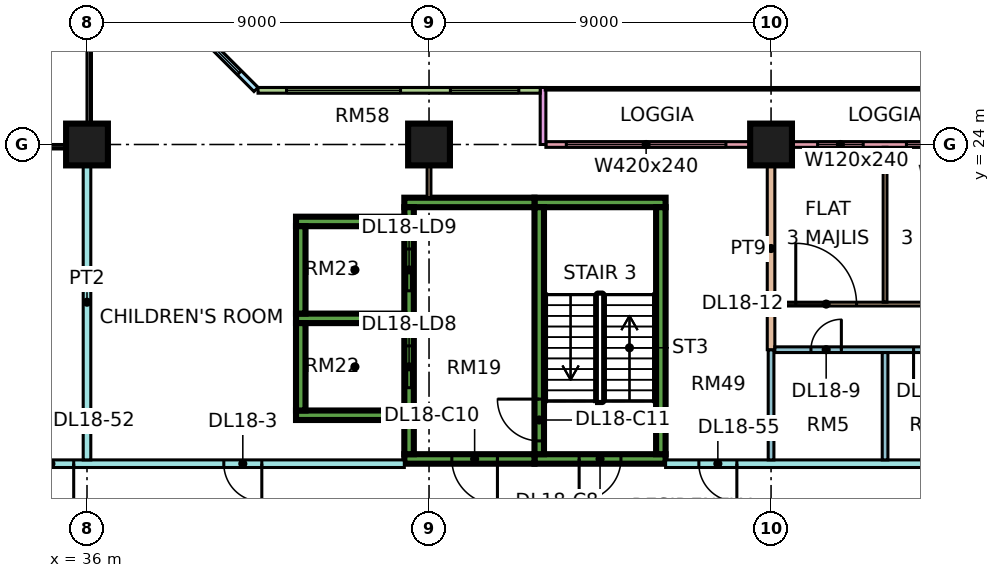
"""IFC4 building model, lengths in metres.
Left out: names, types, materials, properties, quantities, classifications, styles, units other than length and angle.
Written with IfcOpenShell. Run it as: python <this file> out.ifc"""

import sys

from ifc_helpers import new_model, si_unit, direction, frame, frame_2d, origin, origin_2d, place, context, subcontext, project, spatial, rectangle, extrude, element, fill, save


model = new_model("IFC4")
c1 = context("Model", 3, precision=1e-05, world=origin(), true_north=direction((0.0, 1.0)))
c2 = subcontext(c1, "Body", "Model", "MODEL_VIEW")
j1 = project(units=[si_unit("LENGTHUNIT", "METRE"), si_unit("PLANEANGLEUNIT", "RADIAN")], contexts=[c1])
p1 = place(None, origin())
s1 = spatial("IfcSite", under=j1, at=p1, CompositionType="ELEMENT")
p2 = place(p1, origin())
s2 = spatial("IfcBuilding", under=s1, at=p2, CompositionType="ELEMENT")
p3 = place(p2, frame((0.0, 0.0, 82.65)))
s3 = spatial("IfcBuildingStorey", under=s2, at=p3, CompositionType="ELEMENT", Elevation=82.65)
for number, where, z_axis, x_axis in (
    (1, (36.0, 24.0, 0.0), (0.0, 0.0, 1.0), (1.0, 0.0, 0.0)),
    (2, (45.0, 24.0, 0.0), (0.0, 0.0, 1.0), (1.0, 0.0, 0.0)),
    (3, (54.0, 24.0, 0.0), (0.0, 0.0, 1.0), (1.0, 0.0, 0.0)),
):
    element("IfcColumn", number, at=place(p3, frame(where, z_axis=z_axis, x_axis=x_axis)), inside=s3, PredefinedType="COLUMN", context=c2, shape_type="SweptSolid", body=[
        extrude(rectangle(XDim=1.1, YDim=1.1, at=origin_2d()), origin(), (0.0, 0.0, 1.0), 3.75),
    ])
p4 = place(p3, frame((47.775, 15.725, 0.0), z_axis=(0.0, 0.0, 1.0), x_axis=(1.0, 0.0, 0.0)))
e4 = element("IfcWall", 4, at=p4, inside=s3, PredefinedType="SHEAR", context=c2, shape_type="SweptSolid", body=[
    extrude(rectangle(XDim=3.45, YDim=0.25, at=frame_2d((1.725, 0.0))), origin(), (0.0, 0.0, 1.0), 3.75),
])
p5 = place(p4, frame((1.175, 0.0, 0.0)))
e5 = element("IfcOpeningElement", 5, at=p5, cuts=e4, PredefinedType="OPENING", context=c2, shape_type="SweptSolid", body=[
    extrude(rectangle(XDim=1.1, YDim=2.2, at=frame_2d((0.55, 1.1))), frame((0.0, 0.135, 0.0), z_axis=(0.0, -1.0, 0.0), x_axis=(1.0, 0.0, 0.0)), (0.0, 0.0, 1.0), 0.27),
])
p6 = place(p3, frame((47.775, 22.475, 0.0), z_axis=(0.0, 0.0, 1.0), x_axis=(1.0, 0.0, 0.0)))
e6 = element("IfcWall", 6, at=p6, inside=s3, PredefinedType="SHEAR", context=c2, shape_type="SweptSolid", body=[
    extrude(rectangle(XDim=3.45, YDim=0.25, at=frame_2d((1.725, 0.0))), origin(), (0.0, 0.0, 1.0), 3.75),
])
p7 = place(p3, frame((47.9, 15.85, 0.0), z_axis=(0.0, 0.0, 1.0), x_axis=(0.0, 1.0, 0.0)))
e7 = element("IfcWall", 7, at=p7, inside=s3, PredefinedType="SHEAR", context=c2, shape_type="SweptSolid", body=[
    extrude(rectangle(XDim=6.5, YDim=0.25, at=frame_2d((3.25, 0.0))), origin(), (0.0, 0.0, 1.0), 3.75),
])
p8 = place(p7, frame((0.35, 0.0, 0.0)))
e8 = element("IfcOpeningElement", 8, at=p8, cuts=e7, PredefinedType="OPENING", context=c2, shape_type="SweptSolid", body=[
    extrude(rectangle(XDim=1.1, YDim=2.2, at=frame_2d((0.55, 1.1))), frame((0.0, 0.135, 0.0), z_axis=(0.0, -1.0, 0.0), x_axis=(1.0, 0.0, 0.0)), (0.0, 0.0, 1.0), 0.27),
])
p9 = place(p3, frame((51.1, 15.85, 0.0), z_axis=(0.0, 0.0, 1.0), x_axis=(0.0, 1.0, 0.0)))
e9 = element("IfcWall", 9, at=p9, inside=s3, PredefinedType="SHEAR", context=c2, shape_type="SweptSolid", body=[
    extrude(rectangle(XDim=6.5, YDim=0.25, at=frame_2d((3.25, 0.0))), origin(), (0.0, 0.0, 1.0), 3.75),
])
p10 = place(p3, frame((44.35, 15.725, 0.0), z_axis=(0.0, 0.0, 1.0), x_axis=(1.0, 0.0, 0.0)))
e10 = element("IfcWall", 10, at=p10, inside=s3, PredefinedType="SHEAR", context=c2, shape_type="SweptSolid", body=[
    extrude(rectangle(XDim=3.425, YDim=0.25, at=frame_2d((1.712, 0.0))), origin(), (0.0, 0.0, 1.0), 3.75),
])
p11 = place(p10, frame((1.25, 0.0, 0.0)))
e11 = element("IfcOpeningElement", 11, at=p11, cuts=e10, PredefinedType="OPENING", context=c2, shape_type="SweptSolid", body=[
    extrude(rectangle(XDim=1.2, YDim=2.2, at=frame_2d((0.6, 1.1))), frame((0.0, 0.135, 0.0), z_axis=(0.0, -1.0, 0.0), x_axis=(1.0, 0.0, 0.0)), (0.0, 0.0, 1.0), 0.27),
])
p12 = place(p3, frame((44.35, 22.475, 0.0), z_axis=(0.0, 0.0, 1.0), x_axis=(1.0, 0.0, 0.0)))
e12 = element("IfcWall", 12, at=p12, inside=s3, PredefinedType="SHEAR", context=c2, shape_type="SweptSolid", body=[
    extrude(rectangle(XDim=3.425, YDim=0.25, at=frame_2d((1.712, 0.0))), origin(), (0.0, 0.0, 1.0), 3.75),
])
p13 = place(p3, frame((44.475, 15.85, 0.0), z_axis=(0.0, 0.0, 1.0), x_axis=(0.0, 1.0, 0.0)))
e13 = element("IfcWall", 13, at=p13, inside=s3, PredefinedType="SHEAR", context=c2, shape_type="SweptSolid", body=[
    extrude(rectangle(XDim=6.5, YDim=0.25, at=frame_2d((3.25, 0.0))), origin(), (0.0, 0.0, 1.0), 3.75),
])
p14 = place(p13, frame((1.75, 0.0, 0.0)))
e14 = element("IfcOpeningElement", 14, at=p14, cuts=e13, PredefinedType="OPENING", context=c2, shape_type="SweptSolid", body=[
    extrude(rectangle(XDim=1.1, YDim=2.2, at=frame_2d((0.55, 1.1))), frame((0.0, 0.135, 0.0), z_axis=(0.0, -1.0, 0.0), x_axis=(1.0, 0.0, 0.0)), (0.0, 0.0, 1.0), 0.27),
])
p15 = place(p13, frame((4.3, 0.0, 0.0)))
e15 = element("IfcOpeningElement", 15, at=p15, cuts=e13, PredefinedType="OPENING", context=c2, shape_type="SweptSolid", body=[
    extrude(rectangle(XDim=1.1, YDim=2.2, at=frame_2d((0.55, 1.1))), frame((0.0, 0.135, 0.0), z_axis=(0.0, -1.0, 0.0), x_axis=(1.0, 0.0, 0.0)), (0.0, 0.0, 1.0), 0.27),
])
for number, where, z_axis, x_axis in (
    (16, (41.5, 16.875, 0.0), (0.0, 0.0, 1.0), (1.0, 0.0, 0.0)),
    (17, (41.5, 19.425, 0.0), (0.0, 0.0, 1.0), (1.0, 0.0, 0.0)),
    (18, (41.5, 21.975, 0.0), (0.0, 0.0, 1.0), (1.0, 0.0, 0.0)),
):
    element("IfcWall", number, at=place(p3, frame(where, z_axis=z_axis, x_axis=x_axis)), inside=s3, PredefinedType="SHEAR", context=c2, shape_type="SweptSolid", body=[
        extrude(rectangle(XDim=2.85, YDim=0.25, at=frame_2d((1.425, 0.0))), origin(), (0.0, 0.0, 1.0), 3.75),
    ])
for number, where, z_axis, x_axis in (
    (19, (41.625, 17.0, 0.0), (0.0, 0.0, 1.0), (0.0, 1.0, 0.0)),
    (20, (41.625, 19.55, 0.0), (0.0, 0.0, 1.0), (0.0, 1.0, 0.0)),
):
    element("IfcWall", number, at=place(p3, frame(where, z_axis=z_axis, x_axis=x_axis)), inside=s3, PredefinedType="SHEAR", context=c2, shape_type="SweptSolid", body=[
        extrude(rectangle(XDim=2.3, YDim=0.25, at=frame_2d((1.15, 0.0))), origin(), (0.0, 0.0, 1.0), 3.75),
    ])
p16 = place(p3, frame((59.925, 24.0, 0.0), z_axis=(0.0, 0.0, 1.0), x_axis=(-1.0, 0.0, 0.0)))
e21 = element("IfcWall", 21, at=p16, inside=s3, PredefinedType="SOLIDWALL", context=c2, shape_type="SweptSolid", body=[
    extrude(rectangle(XDim=11.85, YDim=0.15, at=frame_2d((5.925, 0.0))), origin(), (0.0, 0.0, 1.0), 3.3),
])
p17 = place(p16, frame((0.562, 0.0, 0.45)))
e22 = element("IfcOpeningElement", 22, at=p17, cuts=e21, PredefinedType="OPENING", context=c2, shape_type="SweptSolid", body=[
    extrude(rectangle(XDim=1.8, YDim=2.4, at=frame_2d((0.9, 1.2))), frame((0.0, 0.085, 0.0), z_axis=(0.0, -1.0, 0.0), x_axis=(1.0, 0.0, 0.0)), (0.0, 0.0, 1.0), 0.17),
])
p18 = place(p16, frame((3.5, 0.0, 0.45)))
e23 = element("IfcOpeningElement", 23, at=p18, cuts=e21, PredefinedType="OPENING", context=c2, shape_type="SweptSolid", body=[
    extrude(rectangle(XDim=1.2, YDim=2.4, at=frame_2d((0.6, 1.2))), frame((0.0, 0.085, 0.0), z_axis=(0.0, -1.0, 0.0), x_axis=(1.0, 0.0, 0.0)), (0.0, 0.0, 1.0), 0.17),
])
p19 = place(p16, frame((7.113, 0.0, 0.45)))
e24 = element("IfcOpeningElement", 24, at=p19, cuts=e21, PredefinedType="OPENING", context=c2, shape_type="SweptSolid", body=[
    extrude(rectangle(XDim=4.2, YDim=2.4, at=frame_2d((2.1, 1.2))), frame((0.0, 0.085, 0.0), z_axis=(0.0, -1.0, 0.0), x_axis=(1.0, 0.0, 0.0)), (0.0, 0.0, 1.0), 0.17),
])
p20 = place(p3, frame((48.0, 25.5, 0.0), z_axis=(0.0, 0.0, 1.0), x_axis=(0.0, -1.0, 0.0)))
e25 = element("IfcWall", 25, at=p20, inside=s3, PredefinedType="SOLIDWALL", context=c2, shape_type="SweptSolid", body=[
    extrude(rectangle(XDim=1.5, YDim=0.15, at=frame_2d((0.75, 0.0))), origin(), (0.0, 0.0, 1.0), 3.3),
])
p21 = place(p3, frame((47.925, 25.425, 0.0), z_axis=(0.0, 0.0, 1.0), x_axis=(-1.0, 0.0, 0.0)))
e26 = element("IfcWall", 26, at=p21, inside=s3, PredefinedType="SOLIDWALL", context=c2, shape_type="SweptSolid", body=[
    extrude(rectangle(XDim=7.425, YDim=0.15, at=frame_2d((3.712, 0.0))), origin(), (0.0, 0.0, 1.0), 3.3),
])
p22 = place(p21, frame((0.562, 0.0, 0.45)))
e27 = element("IfcOpeningElement", 27, at=p22, cuts=e26, PredefinedType="OPENING", context=c2, shape_type="SweptSolid", body=[
    extrude(rectangle(XDim=1.8, YDim=2.4, at=frame_2d((0.9, 1.2))), frame((0.0, 0.085, 0.0), z_axis=(0.0, -1.0, 0.0), x_axis=(1.0, 0.0, 0.0)), (0.0, 0.0, 1.0), 0.17),
])
p23 = place(p21, frame((3.675, 0.0, 0.45)))
e28 = element("IfcOpeningElement", 28, at=p23, cuts=e26, PredefinedType="OPENING", context=c2, shape_type="SweptSolid", body=[
    extrude(rectangle(XDim=3.0, YDim=2.4, at=frame_2d((1.5, 1.2))), frame((0.0, 0.085, 0.0), z_axis=(0.0, -1.0, 0.0), x_axis=(1.0, 0.0, 0.0)), (0.0, 0.0, 1.0), 0.17),
])
p24 = place(p3, frame((40.447, 25.447, 0.0), z_axis=(0.0, 0.0, 1.0), x_axis=(-0.707106781187, 0.707106781187, 0.0)))
e29 = element("IfcWall", 29, at=p24, inside=s3, PredefinedType="SOLIDWALL", context=c2, shape_type="SweptSolid", body=[
    extrude(rectangle(XDim=4.243, YDim=0.15, at=frame_2d((2.121, 0.0))), origin(), (0.0, 0.0, 1.0), 3.3),
])
p25 = place(p24, frame((0.621, 0.0, 0.45)))
e30 = element("IfcOpeningElement", 30, at=p25, cuts=e29, PredefinedType="OPENING", context=c2, shape_type="SweptSolid", body=[
    extrude(rectangle(XDim=3.0, YDim=2.4, at=frame_2d((1.5, 1.2))), frame((0.0, 0.085, 0.0), z_axis=(0.0, -1.0, 0.0), x_axis=(1.0, 0.0, 0.0)), (0.0, 0.0, 1.0), 0.17),
])
p26 = place(p3, frame((34.0, 15.6, 0.0), z_axis=(0.0, 0.0, 1.0), x_axis=(1.0, 0.0, 0.0)))
e31 = element("IfcWall", 31, at=p26, inside=s3, PredefinedType="PARTITIONING", context=c2, shape_type="SweptSolid", body=[
    extrude(rectangle(XDim=10.35, YDim=0.2, at=frame_2d((5.175, 0.0))), origin(), (0.0, 0.0, 1.0), 3.3),
])
p27 = place(p26, frame((5.6, 0.0, 0.0)))
e32 = element("IfcOpeningElement", 32, at=p27, cuts=e31, PredefinedType="OPENING", context=c2, shape_type="SweptSolid", body=[
    extrude(rectangle(XDim=1.0, YDim=2.1, at=frame_2d((0.5, 1.05))), frame((0.0, 0.11, 0.0), z_axis=(0.0, -1.0, 0.0), x_axis=(1.0, 0.0, 0.0)), (0.0, 0.0, 1.0), 0.22),
])
p28 = place(p26, frame((0.45, 0.0, 0.0)))
e33 = element("IfcOpeningElement", 33, at=p28, cuts=e31, PredefinedType="OPENING", context=c2, shape_type="SweptSolid", body=[
    extrude(rectangle(XDim=1.2, YDim=2.1, at=frame_2d((0.6, 1.05))), frame((0.0, 0.11, 0.0), z_axis=(0.0, -1.0, 0.0), x_axis=(1.0, 0.0, 0.0)), (0.0, 0.0, 1.0), 0.22),
])
p29 = place(p3, frame((36.0, 15.7, 0.0), z_axis=(0.0, 0.0, 1.0), x_axis=(0.0, 1.0, 0.0)))
e34 = element("IfcWall", 34, at=p29, inside=s3, PredefinedType="PARTITIONING", context=c2, shape_type="SweptSolid", body=[
    extrude(rectangle(XDim=8.3, YDim=0.2, at=frame_2d((4.15, 0.0))), origin(), (0.0, 0.0, 1.0), 3.3),
])
p30 = place(p3, frame((45.0, 22.6, 0.0), z_axis=(0.0, 0.0, 1.0), x_axis=(0.0, 1.0, 0.0)))
e35 = element("IfcWall", 35, at=p30, inside=s3, PredefinedType="PARTITIONING", context=c2, shape_type="SweptSolid", body=[
    extrude(rectangle(XDim=1.4, YDim=0.1, at=frame_2d((0.7, 0.0))), origin(), (0.0, 0.0, 1.0), 3.3),
])
p31 = place(p3, frame((51.225, 15.6, 0.0), z_axis=(0.0, 0.0, 1.0), x_axis=(1.0, 0.0, 0.0)))
e36 = element("IfcWall", 36, at=p31, inside=s3, PredefinedType="PARTITIONING", context=c2, shape_type="SweptSolid", body=[
    extrude(rectangle(XDim=22.125, YDim=0.2, at=frame_2d((11.062, 0.0))), origin(), (0.0, 0.0, 1.0), 3.3),
])
p32 = place(p31, frame((12.425, 0.0, 0.0)))
e37 = element("IfcOpeningElement", 37, at=p32, cuts=e36, PredefinedType="OPENING", context=c2, shape_type="SweptSolid", body=[
    extrude(rectangle(XDim=1.0, YDim=2.1, at=frame_2d((0.5, 1.05))), frame((0.0, 0.11, 0.0), z_axis=(0.0, -1.0, 0.0), x_axis=(1.0, 0.0, 0.0)), (0.0, 0.0, 1.0), 0.22),
])
p33 = place(p31, frame((0.875, 0.0, 0.0)))
e38 = element("IfcOpeningElement", 38, at=p33, cuts=e36, PredefinedType="OPENING", context=c2, shape_type="SweptSolid", body=[
    extrude(rectangle(XDim=1.0, YDim=2.1, at=frame_2d((0.5, 1.05))), frame((0.0, 0.11, 0.0), z_axis=(0.0, -1.0, 0.0), x_axis=(1.0, 0.0, 0.0)), (0.0, 0.0, 1.0), 0.22),
])
p34 = place(p3, frame((54.0, 15.7, 0.0), z_axis=(0.0, 0.0, 1.0), x_axis=(0.0, 1.0, 0.0)))
e39 = element("IfcWall", 39, at=p34, inside=s3, PredefinedType="PARTITIONING", context=c2, shape_type="SweptSolid", body=[
    extrude(rectangle(XDim=2.9, YDim=0.15, at=frame_2d((1.45, 0.0))), origin(), (0.0, 0.0, 1.0), 3.3),
])
p35 = place(p3, frame((54.0, 18.6, 0.0), z_axis=(0.0, 0.0, 1.0), x_axis=(0.0, 1.0, 0.0)))
e40 = element("IfcWall", 40, at=p35, inside=s3, PredefinedType="PARTITIONING", context=c2, shape_type="SweptSolid", body=[
    extrude(rectangle(XDim=5.326, YDim=0.2, at=frame_2d((2.663, 0.0))), origin(), (0.0, 0.0, 1.0), 3.3),
])
p36 = place(p3, frame((54.1, 18.6, 0.0), z_axis=(0.0, 0.0, 1.0), x_axis=(1.0, 0.0, 0.0)))
e41 = element("IfcWall", 41, at=p36, inside=s3, PredefinedType="PARTITIONING", context=c2, shape_type="SweptSolid", body=[
    extrude(rectangle(XDim=8.975, YDim=0.15, at=frame_2d((4.487, 0.0))), origin(), (0.0, 0.0, 1.0), 3.3),
])
p37 = place(p36, frame((6.65, 0.0, 0.0)))
e42 = element("IfcOpeningElement", 42, at=p37, cuts=e41, PredefinedType="OPENING", context=c2, shape_type="SweptSolid", body=[
    extrude(rectangle(XDim=0.8, YDim=2.1, at=frame_2d((0.4, 1.05))), frame((0.0, 0.085, 0.0), z_axis=(0.0, -1.0, 0.0), x_axis=(1.0, 0.0, 0.0)), (0.0, 0.0, 1.0), 0.17),
])
p38 = place(p36, frame((3.65, 0.0, 0.0)))
e43 = element("IfcOpeningElement", 43, at=p38, cuts=e41, PredefinedType="OPENING", context=c2, shape_type="SweptSolid", body=[
    extrude(rectangle(XDim=0.9, YDim=2.1, at=frame_2d((0.45, 1.05))), frame((0.0, 0.085, 0.0), z_axis=(0.0, -1.0, 0.0), x_axis=(1.0, 0.0, 0.0)), (0.0, 0.0, 1.0), 0.17),
])
p39 = place(p36, frame((0.95, 0.0, 0.0)))
e44 = element("IfcOpeningElement", 44, at=p39, cuts=e41, PredefinedType="OPENING", context=c2, shape_type="SweptSolid", body=[
    extrude(rectangle(XDim=0.8, YDim=2.1, at=frame_2d((0.4, 1.05))), frame((0.0, 0.085, 0.0), z_axis=(0.0, -1.0, 0.0), x_axis=(1.0, 0.0, 0.0)), (0.0, 0.0, 1.0), 0.17),
])
p40 = place(p3, frame((54.1, 19.8, 0.0), z_axis=(0.0, 0.0, 1.0), x_axis=(1.0, 0.0, 0.0)))
e45 = element("IfcWall", 45, at=p40, inside=s3, PredefinedType="PARTITIONING", context=c2, shape_type="SweptSolid", body=[
    extrude(rectangle(XDim=8.95, YDim=0.1, at=frame_2d((4.475, 0.0))), origin(), (0.0, 0.0, 1.0), 3.3),
])
p41 = place(p40, frame((0.55, 0.0, 0.0)))
e46 = element("IfcOpeningElement", 46, at=p41, cuts=e45, PredefinedType="OPENING", context=c2, shape_type="SweptSolid", body=[
    extrude(rectangle(XDim=1.6, YDim=2.1, at=frame_2d((0.8, 1.05))), frame((0.0, 0.06, 0.0), z_axis=(0.0, -1.0, 0.0), x_axis=(1.0, 0.0, 0.0)), (0.0, 0.0, 1.0), 0.12),
])
p42 = place(p40, frame((3.95, 0.0, 0.0)))
e47 = element("IfcOpeningElement", 47, at=p42, cuts=e45, PredefinedType="OPENING", context=c2, shape_type="SweptSolid", body=[
    extrude(rectangle(XDim=0.9, YDim=2.1, at=frame_2d((0.45, 1.05))), frame((0.0, 0.06, 0.0), z_axis=(0.0, -1.0, 0.0), x_axis=(1.0, 0.0, 0.0)), (0.0, 0.0, 1.0), 0.12),
])
p43 = place(p3, frame((57.0, 15.7, 0.0), z_axis=(0.0, 0.0, 1.0), x_axis=(0.0, 1.0, 0.0)))
e48 = element("IfcWall", 48, at=p43, inside=s3, PredefinedType="PARTITIONING", context=c2, shape_type="SweptSolid", body=[
    extrude(rectangle(XDim=2.825, YDim=0.15, at=frame_2d((1.413, 0.0))), origin(), (0.0, 0.0, 1.0), 3.3),
])
p44 = place(p3, frame((57.0, 19.85, 0.0), z_axis=(0.0, 0.0, 1.0), x_axis=(0.0, 1.0, 0.0)))
e49 = element("IfcWall", 49, at=p44, inside=s3, PredefinedType="PARTITIONING", context=c2, shape_type="SweptSolid", body=[
    extrude(rectangle(XDim=4.076, YDim=0.1, at=frame_2d((2.038, 0.0))), origin(), (0.0, 0.0, 1.0), 3.3),
])
p45 = place(p17, origin())
e50 = element("IfcWindow", 50, at=p45, inside=s3, PartitioningType="SINGLE_PANEL", PredefinedType="WINDOW", context=c2, shape_type="SweptSolid", body=[
    extrude(rectangle(XDim=1.8, YDim=2.4, at=frame_2d((0.9, 1.2))), frame((0.0, 0.03, 0.0), z_axis=(0.0, -1.0, 0.0), x_axis=(1.0, 0.0, 0.0)), (0.0, 0.0, 1.0), 0.06),
])
fill(e22, e50)
p46 = place(p18, origin())
e51 = element("IfcWindow", 51, at=p46, inside=s3, PartitioningType="SINGLE_PANEL", PredefinedType="WINDOW", context=c2, shape_type="SweptSolid", body=[
    extrude(rectangle(XDim=1.2, YDim=2.4, at=frame_2d((0.6, 1.2))), frame((0.0, 0.03, 0.0), z_axis=(0.0, -1.0, 0.0), x_axis=(1.0, 0.0, 0.0)), (0.0, 0.0, 1.0), 0.06),
])
fill(e23, e51)
p47 = place(p19, origin())
e52 = element("IfcWindow", 52, at=p47, inside=s3, PartitioningType="SINGLE_PANEL", PredefinedType="WINDOW", context=c2, shape_type="SweptSolid", body=[
    extrude(rectangle(XDim=4.2, YDim=2.4, at=frame_2d((2.1, 1.2))), frame((0.0, 0.03, 0.0), z_axis=(0.0, -1.0, 0.0), x_axis=(1.0, 0.0, 0.0)), (0.0, 0.0, 1.0), 0.06),
])
fill(e24, e52)
p48 = place(p22, origin())
e53 = element("IfcWindow", 53, at=p48, inside=s3, PartitioningType="SINGLE_PANEL", PredefinedType="WINDOW", context=c2, shape_type="SweptSolid", body=[
    extrude(rectangle(XDim=1.8, YDim=2.4, at=frame_2d((0.9, 1.2))), frame((0.0, 0.03, 0.0), z_axis=(0.0, -1.0, 0.0), x_axis=(1.0, 0.0, 0.0)), (0.0, 0.0, 1.0), 0.06),
])
fill(e27, e53)
p49 = place(p23, origin())
e54 = element("IfcWindow", 54, at=p49, inside=s3, PartitioningType="SINGLE_PANEL", PredefinedType="WINDOW", context=c2, shape_type="SweptSolid", body=[
    extrude(rectangle(XDim=3.0, YDim=2.4, at=frame_2d((1.5, 1.2))), frame((0.0, 0.03, 0.0), z_axis=(0.0, -1.0, 0.0), x_axis=(1.0, 0.0, 0.0)), (0.0, 0.0, 1.0), 0.06),
])
fill(e28, e54)
p50 = place(p25, origin())
e55 = element("IfcWindow", 55, at=p50, inside=s3, PartitioningType="SINGLE_PANEL", PredefinedType="WINDOW", context=c2, shape_type="SweptSolid", body=[
    extrude(rectangle(XDim=3.0, YDim=2.4, at=frame_2d((1.5, 1.2))), frame((0.0, 0.03, 0.0), z_axis=(0.0, -1.0, 0.0), x_axis=(1.0, 0.0, 0.0)), (0.0, 0.0, 1.0), 0.06),
])
fill(e30, e55)
p51 = place(p5, frame((1.1, 0.0, 0.0), z_axis=(0.0, 0.0, 1.0), x_axis=(-1.0, 0.0, 0.0)))
e56 = element("IfcDoor", 56, at=p51, inside=s3, OperationType="SINGLE_SWING_LEFT", PredefinedType="DOOR", context=c2, shape_type="SweptSolid", body=[
    extrude(rectangle(XDim=1.1, YDim=2.2, at=frame_2d((0.55, 1.1))), frame((0.0, 0.025, 0.0), z_axis=(0.0, -1.0, 0.0), x_axis=(1.0, 0.0, 0.0)), (0.0, 0.0, 1.0), 0.05),
])
fill(e5, e56)
p52 = place(p11, origin())
e57 = element("IfcDoor", 57, at=p52, inside=s3, OperationType="SINGLE_SWING_RIGHT", PredefinedType="DOOR", context=c2, shape_type="SweptSolid", body=[
    extrude(rectangle(XDim=1.2, YDim=2.2, at=frame_2d((0.6, 1.1))), frame((0.0, 0.025, 0.0), z_axis=(0.0, -1.0, 0.0), x_axis=(1.0, 0.0, 0.0)), (0.0, 0.0, 1.0), 0.05),
])
fill(e11, e57)
p53 = place(p8, frame((1.1, 0.0, 0.0), z_axis=(0.0, 0.0, 1.0), x_axis=(-1.0, 0.0, 0.0)))
e58 = element("IfcDoor", 58, at=p53, inside=s3, OperationType="SINGLE_SWING_RIGHT", PredefinedType="DOOR", context=c2, shape_type="SweptSolid", body=[
    extrude(rectangle(XDim=1.1, YDim=2.2, at=frame_2d((0.55, 1.1))), frame((0.0, 0.025, 0.0), z_axis=(0.0, -1.0, 0.0), x_axis=(1.0, 0.0, 0.0)), (0.0, 0.0, 1.0), 0.05),
])
fill(e8, e58)
p54 = place(p14, origin())
e59 = element("IfcDoor", 59, at=p54, inside=s3, OperationType="DOUBLE_DOOR_SLIDING", PredefinedType="DOOR", context=c2, shape_type="SweptSolid", body=[
    extrude(rectangle(XDim=1.1, YDim=2.2, at=frame_2d((0.55, 1.1))), frame((0.0, 0.025, 0.0), z_axis=(0.0, -1.0, 0.0), x_axis=(1.0, 0.0, 0.0)), (0.0, 0.0, 1.0), 0.05),
])
fill(e14, e59)
p55 = place(p15, origin())
e60 = element("IfcDoor", 60, at=p55, inside=s3, OperationType="DOUBLE_DOOR_SLIDING", PredefinedType="DOOR", context=c2, shape_type="SweptSolid", body=[
    extrude(rectangle(XDim=1.1, YDim=2.2, at=frame_2d((0.55, 1.1))), frame((0.0, 0.025, 0.0), z_axis=(0.0, -1.0, 0.0), x_axis=(1.0, 0.0, 0.0)), (0.0, 0.0, 1.0), 0.05),
])
fill(e15, e60)
p56 = place(p27, origin())
e61 = element("IfcDoor", 61, at=p56, inside=s3, OperationType="SINGLE_SWING_RIGHT", PredefinedType="DOOR", context=c2, shape_type="SweptSolid", body=[
    extrude(rectangle(XDim=1.0, YDim=2.1, at=frame_2d((0.5, 1.05))), frame((0.0, 0.025, 0.0), z_axis=(0.0, -1.0, 0.0), x_axis=(1.0, 0.0, 0.0)), (0.0, 0.0, 1.0), 0.05),
])
fill(e32, e61)
p57 = place(p38, frame((0.9, 0.0, 0.0), z_axis=(0.0, 0.0, 1.0), x_axis=(-1.0, 0.0, 0.0)))
e62 = element("IfcDoor", 62, at=p57, inside=s3, OperationType="SINGLE_SWING_LEFT", PredefinedType="DOOR", context=c2, shape_type="SweptSolid", body=[
    extrude(rectangle(XDim=0.9, YDim=2.1, at=frame_2d((0.45, 1.05))), frame((0.0, 0.025, 0.0), z_axis=(0.0, -1.0, 0.0), x_axis=(1.0, 0.0, 0.0)), (0.0, 0.0, 1.0), 0.05),
])
fill(e43, e62)
p58 = place(p39, frame((0.8, 0.0, 0.0), z_axis=(0.0, 0.0, 1.0), x_axis=(-1.0, 0.0, 0.0)))
e63 = element("IfcDoor", 63, at=p58, inside=s3, OperationType="SINGLE_SWING_RIGHT", PredefinedType="DOOR", context=c2, shape_type="SweptSolid", body=[
    extrude(rectangle(XDim=0.8, YDim=2.1, at=frame_2d((0.4, 1.05))), frame((0.0, 0.025, 0.0), z_axis=(0.0, -1.0, 0.0), x_axis=(1.0, 0.0, 0.0)), (0.0, 0.0, 1.0), 0.05),
])
fill(e44, e63)
p59 = place(p41, origin())
e64 = element("IfcDoor", 64, at=p59, inside=s3, OperationType="DOUBLE_DOOR_SINGLE_SWING", PredefinedType="DOOR", context=c2, shape_type="SweptSolid", body=[
    extrude(rectangle(XDim=1.6, YDim=2.1, at=frame_2d((0.8, 1.05))), frame((0.0, 0.025, 0.0), z_axis=(0.0, -1.0, 0.0), x_axis=(1.0, 0.0, 0.0)), (0.0, 0.0, 1.0), 0.05),
])
fill(e46, e64)
p60 = place(p28, origin())
e65 = element("IfcDoor", 65, at=p60, inside=s3, OperationType="SINGLE_SWING_RIGHT", PredefinedType="DOOR", context=c2, shape_type="SweptSolid", body=[
    extrude(rectangle(XDim=1.2, YDim=2.1, at=frame_2d((0.6, 1.05))), frame((0.0, 0.025, 0.0), z_axis=(0.0, -1.0, 0.0), x_axis=(1.0, 0.0, 0.0)), (0.0, 0.0, 1.0), 0.05),
])
fill(e33, e65)
p61 = place(p33, origin())
e66 = element("IfcDoor", 66, at=p61, inside=s3, OperationType="SINGLE_SWING_RIGHT", PredefinedType="DOOR", context=c2, shape_type="SweptSolid", body=[
    extrude(rectangle(XDim=1.0, YDim=2.1, at=frame_2d((0.5, 1.05))), frame((0.0, 0.025, 0.0), z_axis=(0.0, -1.0, 0.0), x_axis=(1.0, 0.0, 0.0)), (0.0, 0.0, 1.0), 0.05),
])
fill(e38, e66)
save(model, sys.argv[1])
